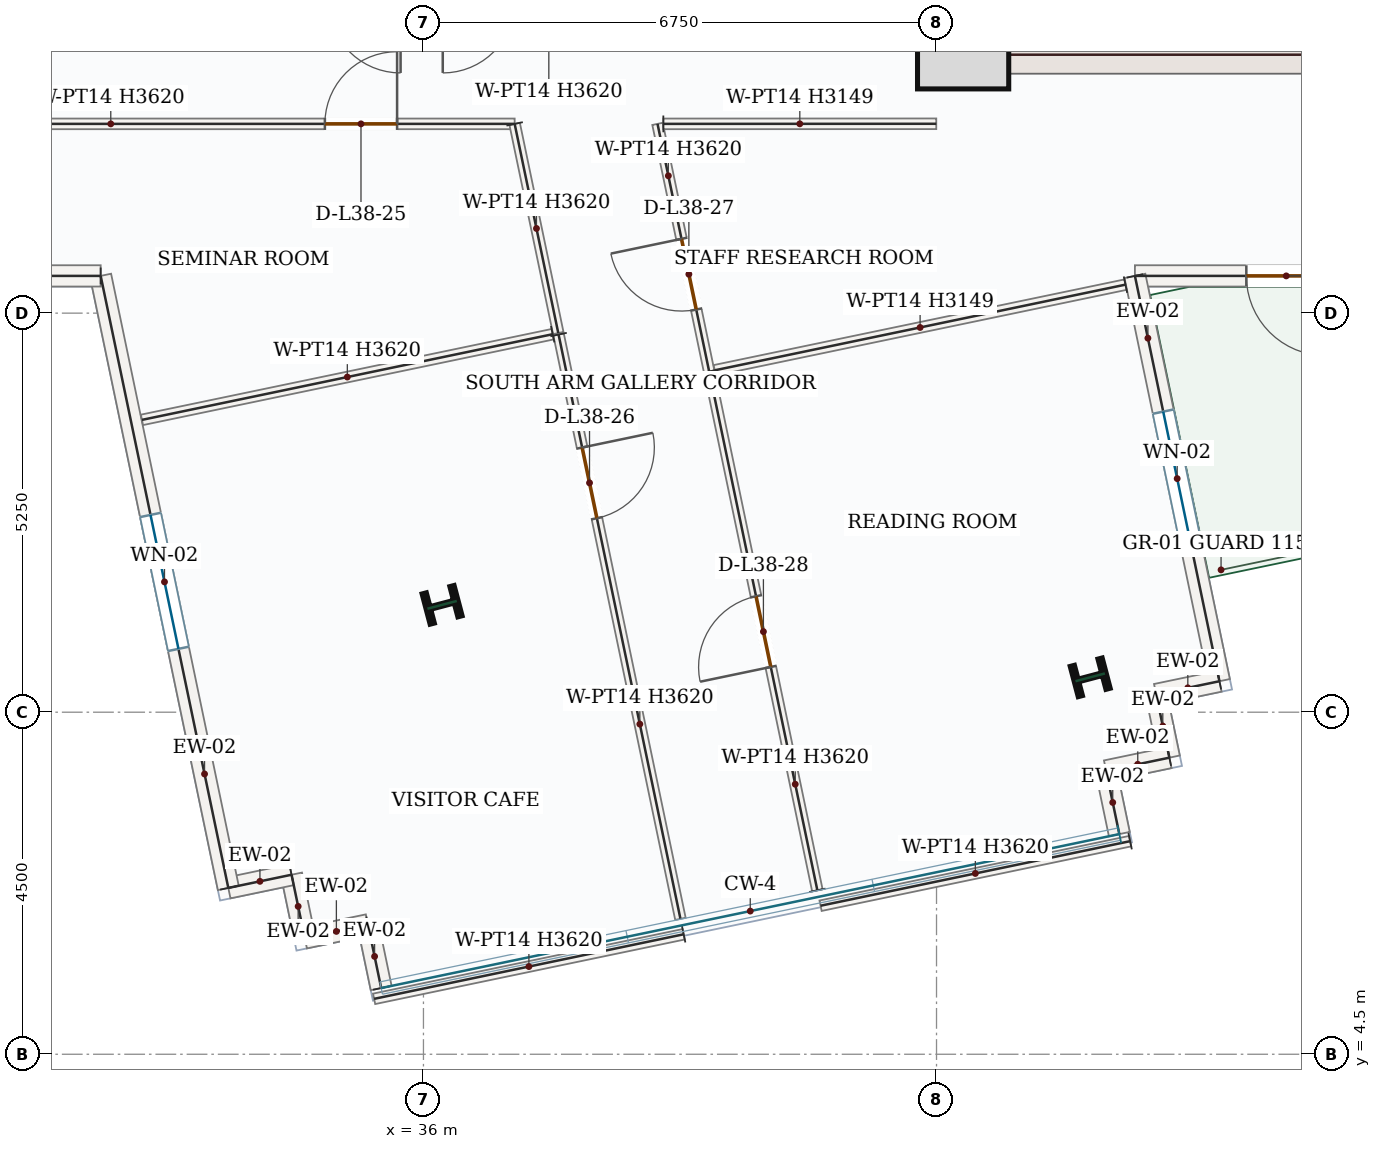
"""IFC4 building model, lengths in metres.
Left out: names, types, materials, properties, quantities, classifications, styles, units other than length and angle.
Written with IfcOpenShell. Run it as: python <this file> out.ifc"""

import sys

from ifc_helpers import new_model, si_unit, direction, frame, frame_2d, origin, origin_2d, place, context, subcontext, project, spatial, rectangle, i_section, extrude, source, transform, mapped, element, fill, save


model = new_model("IFC4")
c1 = context("Model", 3, precision=1e-05, world=origin(), true_north=direction((0.0, 1.0)))
c2 = subcontext(c1, "Body", "Model", "MODEL_VIEW")
j1 = project(units=[si_unit("LENGTHUNIT", "METRE"), si_unit("PLANEANGLEUNIT", "RADIAN")], contexts=[c1])
p1 = place(None, origin())
s1 = spatial("IfcSite", under=j1, at=p1, CompositionType="ELEMENT")
p2 = place(p1, origin())
s2 = spatial("IfcBuilding", under=s1, at=p2, CompositionType="ELEMENT")
p3 = place(p2, frame((0.0, 0.0, 166.8)))
s3 = spatial("IfcBuildingStorey", under=s2, at=p3, CompositionType="ELEMENT", Elevation=166.8)
p4 = place(p3, frame((43.0, 17.4, 0.0), z_axis=(0.0, 0.0, 1.0), x_axis=(0.0, 1.0, 0.0)))
e1 = element("IfcWall", 1, at=p4, inside=s3, PredefinedType="SHEAR", context=c2, shape_type="SweptSolid", body=[
    extrude(rectangle(XDim=8.55, YDim=0.5, at=frame_2d((4.275, 0.0))), origin(), (0.0, 0.0, 1.0), 3.62),
])
p5 = place(p4, frame((6.65, 0.0, 0.0)))
e2 = element("IfcOpeningElement", 2, at=p5, cuts=e1, PredefinedType="OPENING", context=c2, shape_type="SweptSolid", body=[
    extrude(rectangle(XDim=1.1, YDim=2.2, at=frame_2d((0.55, 1.1))), frame((0.0, 0.26, 0.0), z_axis=(0.0, -1.0, 0.0), x_axis=(1.0, 0.0, 0.0)), (0.0, 0.0, 1.0), 0.52),
])
p6 = place(p4, frame((1.75, 0.0, 0.0)))
e3 = element("IfcOpeningElement", 3, at=p6, cuts=e1, PredefinedType="OPENING", context=c2, shape_type="SweptSolid", body=[
    extrude(rectangle(XDim=1.3, YDim=2.2, at=frame_2d((0.65, 1.1))), frame((0.0, 0.26, 0.0), z_axis=(0.0, -1.0, 0.0), x_axis=(1.0, 0.0, 0.0)), (0.0, 0.0, 1.0), 0.52),
])
p7 = place(p4, frame((4.55, 0.0, 0.0)))
e4 = element("IfcOpeningElement", 4, at=p7, cuts=e1, PredefinedType="OPENING", context=c2, shape_type="SweptSolid", body=[
    extrude(rectangle(XDim=0.88, YDim=2.1, at=frame_2d((0.44, 1.05))), frame((0.0, 0.26, 0.0), z_axis=(0.0, -1.0, 0.0), x_axis=(1.0, 0.0, 0.0)), (0.0, 0.0, 1.0), 0.52),
])
m1 = source(origin(), c2, "Body", "SweptSolid", [
    extrude(rectangle(XDim=7.0, YDim=0.5, at=frame_2d((3.5, 0.0))), origin(), (0.0, 0.0, 1.0), 3.62),
])
p8 = place(p3, frame((43.25, 17.65, 0.0), z_axis=(0.0, 0.0, 1.0), x_axis=(1.0, 0.0, 0.0)))
e5 = element("IfcWall", 5, at=p8, inside=s3, PredefinedType="SHEAR", context=c2, shape_type="MappedRepresentation", body=[
    mapped(m1, transform((0.0, 0.0, 0.0), x_axis=(1.0, 0.0, 0.0), y_axis=(0.0, 1.0, 0.0), z_axis=(0.0, 0.0, 1.0), scale=1.0)),
])
m2 = source(origin(), c2, "Body", "SweptSolid", [
    extrude(rectangle(XDim=1.2, YDim=1.2, at=origin_2d()), origin(), (0.0, 0.0, 1.0), 3.9),
])
p9 = place(p3, frame((43.1, 17.8, 0.0), z_axis=(0.0, 0.0, 1.0), x_axis=(1.0, 0.0, 0.0)))
e6 = element("IfcColumn", 6, at=p9, inside=s3, PredefinedType="COLUMN", context=c2, shape_type="MappedRepresentation", body=[
    mapped(m2, transform((0.0, 0.0, 0.0), x_axis=(1.0, 0.0, 0.0), y_axis=(0.0, 1.0, 0.0), z_axis=(0.0, 0.0, 1.0), scale=1.0)),
])
m3 = source(origin(), c2, "Body", "SweptSolid", [
    extrude(i_section(OverallWidth=0.412, OverallDepth=0.435, WebThickness=0.036, FlangeThickness=0.057, FilletRadius=0.018, at=origin_2d()), origin(), (0.0, 0.0, 1.0), 3.9),
])
for number, where, z_axis, x_axis in (
    (7, (36.245, 10.412, 0.0), (0.0, 0.0, 1.0), (-0.255, 0.967, 0.0)),
    (8, (44.772, 9.459, 0.0), (0.0, 0.0, 1.0), (-0.255, 0.967, 0.0)),
):
    element("IfcColumn", number, at=place(p3, frame(where, z_axis=z_axis, x_axis=x_axis)), inside=s3, PredefinedType="COLUMN", context=c2, shape_type="MappedRepresentation", body=[
        mapped(m3, transform((0.0, 0.0, 0.0), x_axis=(1.0, 0.0, 0.0), y_axis=(0.0, 1.0, 0.0), z_axis=(0.0, 0.0, 1.0), scale=1.0)),
    ])
p10 = place(p3, frame((49.342, 14.74, 0.0), z_axis=(0.0, 0.0, 1.0), x_axis=(-1.0, 0.0, 0.0)))
e9 = element("IfcWall", 9, at=p10, inside=s3, PredefinedType="SOLIDWALL", context=c2, shape_type="SweptSolid", body=[
    extrude(rectangle(XDim=3.982, YDim=0.28, at=frame_2d((1.991, 0.0))), origin(), (0.0, 0.0, 1.0), 3.62),
])
p11 = place(p10, frame((1.466, 0.0, 0.0)))
e10 = element("IfcOpeningElement", 10, at=p11, cuts=e9, PredefinedType="OPENING", context=c2, shape_type="SweptSolid", body=[
    extrude(rectangle(XDim=1.05, YDim=2.15, at=frame_2d((0.525, 1.075))), frame((0.0, 0.15, 0.0), z_axis=(0.0, -1.0, 0.0), x_axis=(1.0, 0.0, 0.0)), (0.0, 0.0, 1.0), 0.3),
])
p12 = place(p3, frame((45.36, 14.74, 0.0), z_axis=(0.0, 0.0, 1.0), x_axis=(0.204151126022, -0.978939384101, 0.0)))
e11 = element("IfcWall", 11, at=p12, inside=s3, PredefinedType="SOLIDWALL", context=c2, shape_type="SweptSolid", body=[
    extrude(rectangle(XDim=5.447, YDim=0.28, at=frame_2d((2.724, 0.0))), origin(), (0.0, 0.0, 1.0), 3.62),
])
p13 = place(p12, frame((1.824, 0.0, 0.85)))
e12 = element("IfcOpeningElement", 12, at=p13, cuts=e11, PredefinedType="OPENING", context=c2, shape_type="SweptSolid", body=[
    extrude(rectangle(XDim=1.8, YDim=1.75, at=frame_2d((0.9, 0.875))), frame((0.0, 0.15, 0.0), z_axis=(0.0, -1.0, 0.0), x_axis=(1.0, 0.0, 0.0)), (0.0, 0.0, 1.0), 0.3),
])
m4 = source(origin(), c2, "Body", "SweptSolid", [
    extrude(rectangle(XDim=0.85, YDim=0.28, at=frame_2d((0.425, 0.0))), origin(), (0.0, 0.0, 1.0), 3.62),
])
for number, where, z_axis, x_axis in (
    (13, (46.472, 9.407, 0.0), (0.0, 0.0, 1.0), (-0.979, -0.204, 0.0)),
    (14, (45.64, 9.234, 0.0), (0.0, 0.0, 1.0), (0.204, -0.979, 0.0)),
):
    element("IfcWall", number, at=place(p3, frame(where, z_axis=z_axis, x_axis=x_axis)), inside=s3, PredefinedType="SOLIDWALL", context=c2, shape_type="MappedRepresentation", body=[
        mapped(m4, transform((0.0, 0.0, 0.0), x_axis=(1.0, 0.0, 0.0), y_axis=(0.0, 1.0, 0.0), z_axis=(0.0, 0.0, 1.0), scale=1.0)),
    ])
m5 = source(origin(), c2, "Body", "SweptSolid", [
    extrude(rectangle(XDim=0.85, YDim=0.28, at=frame_2d((0.425, 0.0))), origin(), (0.0, 0.0, 1.0), 3.62),
])
p14 = place(p3, frame((45.814, 8.402, 0.0), z_axis=(0.0, 0.0, 1.0), x_axis=(-0.97893500384, -0.204172128991, 0.0)))
e15 = element("IfcWall", 15, at=p14, inside=s3, PredefinedType="SOLIDWALL", context=c2, shape_type="MappedRepresentation", body=[
    mapped(m5, transform((0.0, 0.0, 0.0), x_axis=(1.0, 0.0, 0.0), y_axis=(0.0, 1.0, 0.0), z_axis=(0.0, 0.0, 1.0), scale=1.0)),
])
for number, where, z_axis, x_axis in (
    (16, (44.981, 8.228, 0.0), (0.0, 0.0, 1.0), (0.204, -0.979, 0.0)),
    (17, (35.444, 5.371, 0.0), (0.0, 0.0, 1.0), (-0.204, 0.979, 0.0)),
    (18, (35.271, 6.203, 0.0), (0.0, 0.0, 1.0), (-0.979, -0.204, 0.0)),
    (19, (34.438, 6.03, 0.0), (0.0, 0.0, 1.0), (-0.204, 0.979, 0.0)),
):
    element("IfcWall", number, at=place(p3, frame(where, z_axis=z_axis, x_axis=x_axis)), inside=s3, PredefinedType="SOLIDWALL", context=c2, shape_type="MappedRepresentation", body=[
        mapped(m4, transform((0.0, 0.0, 0.0), x_axis=(1.0, 0.0, 0.0), y_axis=(0.0, 1.0, 0.0), z_axis=(0.0, 0.0, 1.0), scale=1.0)),
    ])
p15 = place(p3, frame((34.265, 6.862, 0.0), z_axis=(0.0, 0.0, 1.0), x_axis=(-0.97893500384, -0.204172128991, 0.0)))
e20 = element("IfcWall", 20, at=p15, inside=s3, PredefinedType="SOLIDWALL", context=c2, shape_type="MappedRepresentation", body=[
    mapped(m5, transform((0.0, 0.0, 0.0), x_axis=(1.0, 0.0, 0.0), y_axis=(0.0, 1.0, 0.0), z_axis=(0.0, 0.0, 1.0), scale=1.0)),
])
p16 = place(p3, frame((33.433, 6.688, 0.0), z_axis=(0.0, 0.0, 1.0), x_axis=(-0.204152195211, 0.978939161128, 0.0)))
e21 = element("IfcWall", 21, at=p16, inside=s3, PredefinedType="SOLIDWALL", context=c2, shape_type="SweptSolid", body=[
    extrude(rectangle(XDim=8.225, YDim=0.28, at=frame_2d((4.113, 0.0))), origin(), (0.0, 0.0, 1.0), 3.62),
])
p17 = place(p16, frame((3.213, 0.0, 0.85)))
e22 = element("IfcOpeningElement", 22, at=p17, cuts=e21, PredefinedType="OPENING", context=c2, shape_type="SweptSolid", body=[
    extrude(rectangle(XDim=1.8, YDim=1.75, at=frame_2d((0.9, 0.875))), frame((0.0, 0.15, 0.0), z_axis=(0.0, -1.0, 0.0), x_axis=(1.0, 0.0, 0.0)), (0.0, 0.0, 1.0), 0.3),
])
p18 = place(p3, frame((31.753, 14.74, 0.0), z_axis=(0.0, 0.0, 1.0), x_axis=(-1.0, 0.0, 0.0)))
e23 = element("IfcWall", 23, at=p18, inside=s3, PredefinedType="SOLIDWALL", context=c2, shape_type="SweptSolid", body=[
    extrude(rectangle(XDim=9.095, YDim=0.28, at=frame_2d((4.548, 0.0))), origin(), (0.0, 0.0, 1.0), 3.62),
])
p19 = place(p18, frame((3.648, 0.0, 0.85)))
e24 = element("IfcOpeningElement", 24, at=p19, cuts=e23, PredefinedType="OPENING", context=c2, shape_type="SweptSolid", body=[
    extrude(rectangle(XDim=1.8, YDim=1.75, at=frame_2d((0.9, 0.875))), frame((0.0, 0.15, 0.0), z_axis=(0.0, -1.0, 0.0), x_axis=(1.0, 0.0, 0.0)), (0.0, 0.0, 1.0), 0.3),
])
p20 = place(p3, frame((29.219, 16.74, 0.0), z_axis=(0.0, 0.0, 1.0), x_axis=(1.0, 0.0, 0.0)))
e25 = element("IfcWall", 25, at=p20, inside=s3, PredefinedType="PARTITIONING", context=c2, shape_type="SweptSolid", body=[
    extrude(rectangle(XDim=7.98, YDim=0.14, at=frame_2d((3.99, 0.0))), origin(), (0.0, 0.0, 1.0), 3.62),
])
p21 = place(p20, frame((5.484, 0.0, 0.0)))
e26 = element("IfcOpeningElement", 26, at=p21, cuts=e25, PredefinedType="OPENING", context=c2, shape_type="SweptSolid", body=[
    extrude(rectangle(XDim=0.95, YDim=2.15, at=frame_2d((0.475, 1.075))), frame((0.0, 0.08, 0.0), z_axis=(0.0, -1.0, 0.0), x_axis=(1.0, 0.0, 0.0)), (0.0, 0.0, 1.0), 0.16),
])
m6 = source(origin(), c2, "Body", "SweptSolid", [
    extrude(rectangle(XDim=2.811, YDim=0.14, at=frame_2d((1.406, 0.0))), origin(), (0.0, 0.0, 1.0), 3.62),
])
p22 = place(p3, frame((37.2, 16.74, 0.0), z_axis=(0.0, 0.0, 1.0), x_axis=(0.204092977776, -0.978951508719, 0.0)))
e27 = element("IfcWall", 27, at=p22, inside=s3, PredefinedType="PARTITIONING", context=c2, shape_type="MappedRepresentation", body=[
    mapped(m6, transform((0.0, 0.0, 0.0), x_axis=(1.0, 0.0, 0.0), y_axis=(0.0, 1.0, 0.0), z_axis=(0.0, 0.0, 1.0), scale=1.0)),
])
m7 = source(origin(), c2, "Body", "SweptSolid", [
    extrude(rectangle(XDim=5.52, YDim=0.14, at=frame_2d((2.76, 0.0))), origin(), (0.0, 0.0, 1.0), 3.62),
])
p23 = place(p3, frame((37.7, 13.973, 0.0), z_axis=(0.0, 0.0, 1.0), x_axis=(-0.978929612498, -0.204197976909, 0.0)))
e28 = element("IfcWall", 28, at=p23, inside=s3, PredefinedType="PARTITIONING", context=c2, shape_type="MappedRepresentation", body=[
    mapped(m7, transform((0.0, 0.0, 0.0), x_axis=(1.0, 0.0, 0.0), y_axis=(0.0, 1.0, 0.0), z_axis=(0.0, 0.0, 1.0), scale=1.0)),
])
p24 = place(p3, frame((39.759, 13.483, 0.0), z_axis=(0.0, 0.0, 1.0), x_axis=(-0.204124193585, 0.97894500029, 0.0)))
e29 = element("IfcWall", 29, at=p24, inside=s3, PredefinedType="PARTITIONING", context=c2, shape_type="SweptSolid", body=[
    extrude(rectangle(XDim=3.327, YDim=0.14, at=frame_2d((1.664, 0.0))), origin(), (0.0, 0.0, 1.0), 3.62),
])
p25 = place(p24, frame((0.832, 0.0, 0.0)))
e30 = element("IfcOpeningElement", 30, at=p25, cuts=e29, PredefinedType="OPENING", context=c2, shape_type="SweptSolid", body=[
    extrude(rectangle(XDim=0.95, YDim=2.15, at=frame_2d((0.475, 1.075))), frame((0.0, 0.08, 0.0), z_axis=(0.0, -1.0, 0.0), x_axis=(1.0, 0.0, 0.0)), (0.0, 0.0, 1.0), 0.16),
])
m8 = source(origin(), c2, "Body", "SweptSolid", [
    extrude(rectangle(XDim=3.591, YDim=0.14, at=frame_2d((1.795, 0.0))), origin(), (0.0, 0.0, 1.0), 3.149),
])
p26 = place(p3, frame((39.156, 16.74, 0.0), z_axis=(0.0, 0.0, 1.0), x_axis=(0.999999942209, 0.000339974142, 0.0)))
e31 = element("IfcWall", 31, at=p26, inside=s3, PredefinedType="PARTITIONING", context=c2, shape_type="MappedRepresentation", body=[
    mapped(m8, transform((0.0, 0.0, 0.0), x_axis=(1.0, 0.0, 0.0), y_axis=(0.0, 1.0, 0.0), z_axis=(0.0, 0.0, 1.0), scale=1.0)),
])
m9 = source(origin(), c2, "Body", "SweptSolid", [
    extrude(rectangle(XDim=5.52, YDim=0.14, at=frame_2d((2.76, 0.0))), origin(), (0.0, 0.0, 1.0), 3.149),
])
p27 = place(p3, frame((45.236, 14.625, 0.0), z_axis=(0.0, 0.0, 1.0), x_axis=(-0.97893845252, -0.204155593062, 0.0)))
e32 = element("IfcWall", 32, at=p27, inside=s3, PredefinedType="PARTITIONING", context=c2, shape_type="MappedRepresentation", body=[
    mapped(m9, transform((0.0, 0.0, 0.0), x_axis=(1.0, 0.0, 0.0), y_axis=(0.0, 1.0, 0.0), z_axis=(0.0, 0.0, 1.0), scale=1.0)),
])
m10 = source(origin(), c2, "Body", "SweptSolid", [
    extrude(rectangle(XDim=4.16, YDim=0.14, at=frame_2d((2.08, 0.0))), origin(), (0.0, 0.0, 1.0), 3.62),
])
p28 = place(p3, frame((45.297, 7.303, 0.0), z_axis=(0.0, 0.0, 1.0), x_axis=(-0.978935967244, -0.204167509744, 0.0)))
e33 = element("IfcWall", 33, at=p28, inside=s3, PredefinedType="PARTITIONING", context=c2, shape_type="MappedRepresentation", body=[
    mapped(m10, transform((0.0, 0.0, 0.0), x_axis=(1.0, 0.0, 0.0), y_axis=(0.0, 1.0, 0.0), z_axis=(0.0, 0.0, 1.0), scale=1.0)),
])
p29 = place(p3, frame((41.182, 6.657, 0.0), z_axis=(0.0, 0.0, 1.0), x_axis=(-0.204158980406, 0.97893774609, 0.0)))
e34 = element("IfcWall", 34, at=p29, inside=s3, PredefinedType="PARTITIONING", context=c2, shape_type="SweptSolid", body=[
    extrude(rectangle(XDim=6.953, YDim=0.14, at=frame_2d((3.476, 0.0))), origin(), (0.0, 0.0, 1.0), 3.62),
])
p30 = place(p29, frame((3.001, 0.0, 0.0)))
e35 = element("IfcOpeningElement", 35, at=p30, cuts=e34, PredefinedType="OPENING", context=c2, shape_type="SweptSolid", body=[
    extrude(rectangle(XDim=0.95, YDim=2.15, at=frame_2d((0.475, 1.075))), frame((0.0, 0.08, 0.0), z_axis=(0.0, -1.0, 0.0), x_axis=(1.0, 0.0, 0.0)), (0.0, 0.0, 1.0), 0.16),
])
p31 = place(p3, frame((37.778, 13.969, 0.0), z_axis=(0.0, 0.0, 1.0), x_axis=(0.204175249208, -0.978934353065, 0.0)))
e36 = element("IfcWall", 36, at=p31, inside=s3, PredefinedType="PARTITIONING", context=c2, shape_type="SweptSolid", body=[
    extrude(rectangle(XDim=7.853, YDim=0.14, at=frame_2d((3.926, 0.0))), origin(), (0.0, 0.0, 1.0), 3.62),
])
p32 = place(p31, frame((1.519, 0.0, 0.0)))
e37 = element("IfcOpeningElement", 37, at=p32, cuts=e36, PredefinedType="OPENING", context=c2, shape_type="SweptSolid", body=[
    extrude(rectangle(XDim=0.95, YDim=2.15, at=frame_2d((0.475, 1.075))), frame((0.0, 0.08, 0.0), z_axis=(0.0, -1.0, 0.0), x_axis=(1.0, 0.0, 0.0)), (0.0, 0.0, 1.0), 0.16),
])
m11 = source(origin(), c2, "Body", "SweptSolid", [
    extrude(rectangle(XDim=4.16, YDim=0.14, at=frame_2d((2.08, 0.0))), origin(), (0.0, 0.0, 1.0), 3.62),
])
p33 = place(p3, frame((39.423, 6.078, 0.0), z_axis=(0.0, 0.0, 1.0), x_axis=(-0.978945249929, -0.204122996358, 0.0)))
e38 = element("IfcWall", 38, at=p33, inside=s3, PredefinedType="PARTITIONING", context=c2, shape_type="MappedRepresentation", body=[
    mapped(m11, transform((0.0, 0.0, 0.0), x_axis=(1.0, 0.0, 0.0), y_axis=(0.0, 1.0, 0.0), z_axis=(0.0, 0.0, 1.0), scale=1.0)),
])
m12 = source(origin(), c2, "Body", "SweptSolid", [
    extrude(rectangle(XDim=1.05, YDim=2.15, at=frame_2d((0.525, 1.075))), frame((0.0, 0.025, 0.0), z_axis=(0.0, -1.0, 0.0), x_axis=(1.0, 0.0, 0.0)), (0.0, 0.0, 1.0), 0.05),
])
p34 = place(p11, origin())
e39 = element("IfcDoor", 39, at=p34, inside=s3, OperationType="SINGLE_SWING_LEFT", PredefinedType="DOOR", context=c2, shape_type="MappedRepresentation", body=[
    mapped(m12, transform((0.0, 0.0, 0.0), x_axis=(1.0, 0.0, 0.0), y_axis=(0.0, 1.0, 0.0), z_axis=(0.0, 0.0, 1.0), scale=1.0)),
])
fill(e10, e39)
m13 = source(origin(), c2, "Body", "SweptSolid", [
    extrude(rectangle(XDim=1.8, YDim=1.75, at=frame_2d((0.9, 0.875))), frame((0.0, 0.03, 0.0), z_axis=(0.0, -1.0, 0.0), x_axis=(1.0, 0.0, 0.0)), (0.0, 0.0, 1.0), 0.06),
])
p35 = place(p13, origin())
e40 = element("IfcWindow", 40, at=p35, inside=s3, PartitioningType="DOUBLE_PANEL_VERTICAL", PredefinedType="WINDOW", context=c2, shape_type="MappedRepresentation", body=[
    mapped(m13, transform((0.0, 0.0, 0.0), x_axis=(1.0, 0.0, 0.0), y_axis=(0.0, 1.0, 0.0), z_axis=(0.0, 0.0, 1.0), scale=1.0)),
])
fill(e12, e40)
p36 = place(p17, origin())
e41 = element("IfcWindow", 41, at=p36, inside=s3, PartitioningType="DOUBLE_PANEL_VERTICAL", PredefinedType="WINDOW", context=c2, shape_type="MappedRepresentation", body=[
    mapped(m13, transform((0.0, 0.0, 0.0), x_axis=(1.0, 0.0, 0.0), y_axis=(0.0, 1.0, 0.0), z_axis=(0.0, 0.0, 1.0), scale=1.0)),
])
fill(e22, e41)
m14 = source(origin(), c2, "Body", "SweptSolid", [
    extrude(rectangle(XDim=0.95, YDim=2.15, at=frame_2d((0.475, 1.075))), frame((0.0, 0.025, 0.0), z_axis=(0.0, -1.0, 0.0), x_axis=(1.0, 0.0, 0.0)), (0.0, 0.0, 1.0), 0.05),
])
p37 = place(p21, origin())
e42 = element("IfcDoor", 42, at=p37, inside=s3, OperationType="SINGLE_SWING_RIGHT", PredefinedType="DOOR", context=c2, shape_type="MappedRepresentation", body=[
    mapped(m14, transform((0.0, 0.0, 0.0), x_axis=(1.0, 0.0, 0.0), y_axis=(0.0, 1.0, 0.0), z_axis=(0.0, 0.0, 1.0), scale=1.0)),
])
fill(e26, e42)
p38 = place(p32, origin())
e43 = element("IfcDoor", 43, at=p38, inside=s3, OperationType="SINGLE_SWING_LEFT", PredefinedType="DOOR", context=c2, shape_type="MappedRepresentation", body=[
    mapped(m14, transform((0.0, 0.0, 0.0), x_axis=(1.0, 0.0, 0.0), y_axis=(0.0, 1.0, 0.0), z_axis=(0.0, 0.0, 1.0), scale=1.0)),
])
fill(e37, e43)
p39 = place(p25, origin())
e44 = element("IfcDoor", 44, at=p39, inside=s3, OperationType="SINGLE_SWING_RIGHT", PredefinedType="DOOR", context=c2, shape_type="MappedRepresentation", body=[
    mapped(m14, transform((0.0, 0.0, 0.0), x_axis=(1.0, 0.0, 0.0), y_axis=(0.0, 1.0, 0.0), z_axis=(0.0, 0.0, 1.0), scale=1.0)),
])
fill(e30, e44)
p40 = place(p30, origin())
e45 = element("IfcDoor", 45, at=p40, inside=s3, OperationType="SINGLE_SWING_LEFT", PredefinedType="DOOR", context=c2, shape_type="MappedRepresentation", body=[
    mapped(m14, transform((0.0, 0.0, 0.0), x_axis=(1.0, 0.0, 0.0), y_axis=(0.0, 1.0, 0.0), z_axis=(0.0, 0.0, 1.0), scale=1.0)),
])
fill(e35, e45)
save(model, sys.argv[1])
